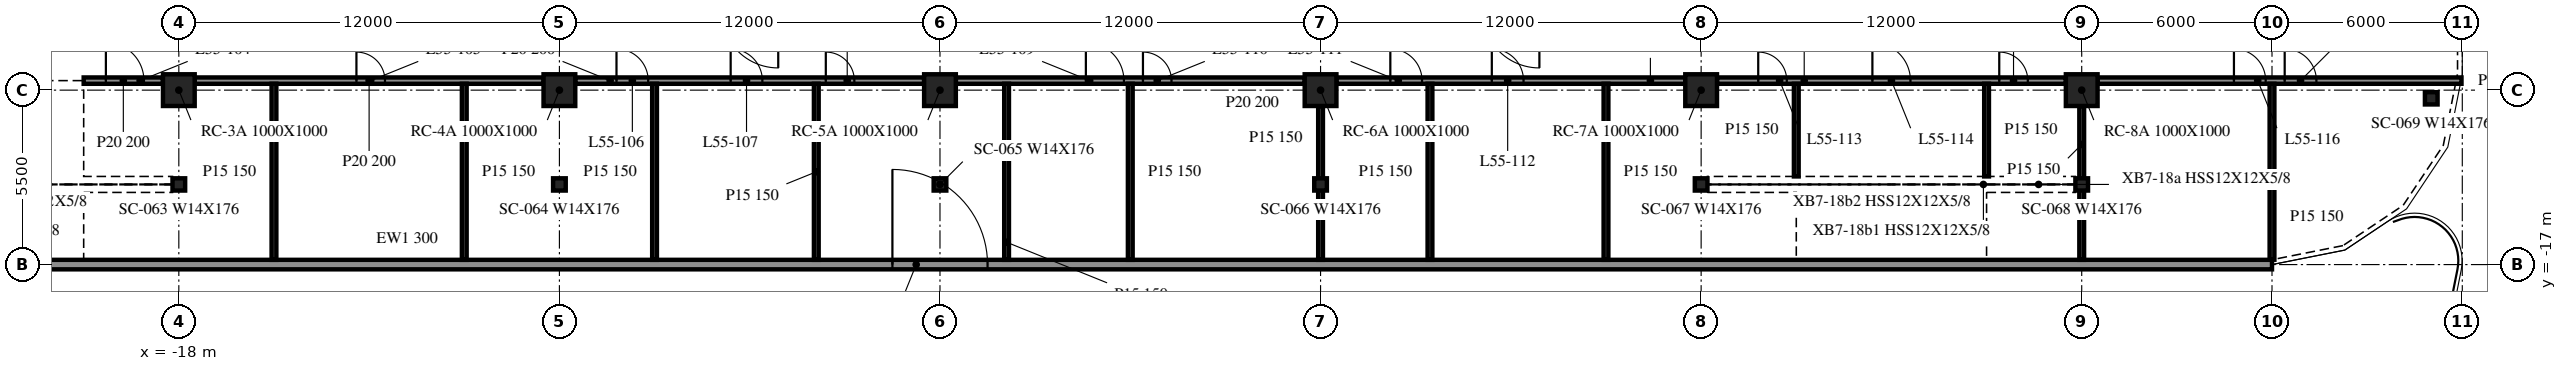
"""IFC4 building model, lengths in metres.
Left out: names, types, materials, properties, quantities, classifications, styles, units other than length and angle.
Written with IfcOpenShell. Run it as: python <this file> out.ifc"""

import sys

from ifc_helpers import new_model, si_unit, direction, frame, frame_2d, origin, origin_2d, place, context, subcontext, project, spatial, rectangle, i_section, extrude, element, fill, save


model = new_model("IFC4")
c1 = context("Model", 3, precision=1e-05, world=origin(), true_north=direction((0.0, 1.0)))
c2 = subcontext(c1, "Body", "Model", "MODEL_VIEW")
j1 = project(units=[si_unit("LENGTHUNIT", "METRE"), si_unit("PLANEANGLEUNIT", "RADIAN")], contexts=[c1])
p1 = place(None, origin())
s1 = spatial("IfcSite", under=j1, at=p1, CompositionType="ELEMENT")
p2 = place(p1, origin())
s2 = spatial("IfcBuilding", under=s1, at=p2, CompositionType="ELEMENT")
p3 = place(p2, frame((0.0, 0.0, 228.6)))
s3 = spatial("IfcBuildingStorey", under=s2, at=p3, CompositionType="ELEMENT", Elevation=228.6)
for number, where, z_axis, x_axis in (
    (1, (-18.0, -11.5, -0.34), (0.0, 0.0, 1.0), (1.0, 0.0, 0.0)),
    (2, (-6.0, -11.5, -0.34), (0.0, 0.0, 1.0), (1.0, 0.0, 0.0)),
    (3, (6.0, -11.5, -0.34), (0.0, 0.0, 1.0), (1.0, 0.0, 0.0)),
    (4, (18.0, -11.5, -0.34), (0.0, 0.0, 1.0), (1.0, 0.0, 0.0)),
    (5, (30.0, -11.5, -0.34), (0.0, 0.0, 1.0), (1.0, 0.0, 0.0)),
    (6, (42.0, -11.5, -0.34), (0.0, 0.0, 1.0), (1.0, 0.0, 0.0)),
):
    element("IfcColumn", number, at=place(p3, frame(where, z_axis=z_axis, x_axis=x_axis)), inside=s3, PredefinedType="COLUMN", context=c2, shape_type="SweptSolid", body=[
        extrude(rectangle(XDim=1.0, YDim=1.0, at=origin_2d()), origin(), (0.0, 0.0, 1.0), 3.8),
    ])
for number, where, z_axis, x_axis in (
    (7, (-18.0, -14.473, -0.34), (0.0, 0.0, 1.0), (1.0, 0.0, 0.0)),
    (8, (-6.0, -14.473, -0.34), (0.0, 0.0, 1.0), (1.0, 0.0, 0.0)),
    (9, (6.0, -14.473, -0.34), (0.0, 0.0, 1.0), (1.0, 0.0, 0.0)),
    (10, (18.0, -14.473, -0.34), (0.0, 0.0, 1.0), (1.0, 0.0, 0.0)),
    (11, (30.0, -14.473, -0.34), (0.0, 0.0, 1.0), (1.0, 0.0, 0.0)),
    (12, (42.0, -14.473, -0.34), (0.0, 0.0, 1.0), (1.0, 0.0, 0.0)),
    (13, (53.021, -11.758, -0.34), (0.0, 0.0, 1.0), (1.0, 0.0, 0.0)),
):
    element("IfcColumn", number, at=place(p3, frame(where, z_axis=z_axis, x_axis=x_axis)), inside=s3, PredefinedType="COLUMN", context=c2, shape_type="SweptSolid", body=[
        extrude(i_section(OverallWidth=0.399, OverallDepth=0.386, WebThickness=0.021, FlangeThickness=0.033, at=origin_2d()), origin(), (0.0, 0.0, 1.0), 3.8),
    ])
p4 = place(p3, frame((-36.0, -17.0, 0.0), z_axis=(0.0, 0.0, 1.0), x_axis=(1.0, 0.0, 0.0)))
e14 = element("IfcWall", 14, at=p4, inside=s3, PredefinedType="NOTDEFINED", context=c2, shape_type="SweptSolid", body=[
    extrude(rectangle(XDim=84.0, YDim=0.3, at=frame_2d((42.0, 0.0))), origin(), (0.0, 0.0, 1.0), 2.853),
])
p5 = place(p4, frame((40.5, 0.0, 0.0)))
e15 = element("IfcOpeningElement", 15, at=p5, cuts=e14, PredefinedType="OPENING", context=c2, shape_type="SweptSolid", body=[
    extrude(rectangle(XDim=3.0, YDim=2.4, at=frame_2d((1.5, 1.2))), frame((0.0, 0.16, 0.0), z_axis=(0.0, -1.0, 0.0), x_axis=(1.0, 0.0, 0.0)), (0.0, 0.0, 1.0), 0.32),
])
p6 = place(p3, frame((-21.0, -11.2, 0.0), z_axis=(0.0, 0.0, 1.0), x_axis=(1.0, 0.0, 0.0)))
e16 = element("IfcWall", 16, at=p6, inside=s3, PredefinedType="PARTITIONING", context=c2, shape_type="SweptSolid", body=[
    extrude(rectangle(XDim=2.5, YDim=0.2, at=frame_2d((1.25, 0.0))), origin(), (0.0, 0.0, 1.0), 3.46),
])
p7 = place(p6, frame((0.7, 0.0, 0.0)))
e17 = element("IfcOpeningElement", 17, at=p7, cuts=e16, PredefinedType="OPENING", context=c2, shape_type="SweptSolid", body=[
    extrude(rectangle(XDim=1.2, YDim=2.1, at=frame_2d((0.6, 1.05))), frame((0.0, 0.11, 0.0), z_axis=(0.0, -1.0, 0.0), x_axis=(1.0, 0.0, 0.0)), (0.0, 0.0, 1.0), 0.22),
])
p8 = place(p3, frame((-17.5, -11.2, 0.0), z_axis=(0.0, 0.0, 1.0), x_axis=(1.0, 0.0, 0.0)))
e18 = element("IfcWall", 18, at=p8, inside=s3, PredefinedType="PARTITIONING", context=c2, shape_type="SweptSolid", body=[
    extrude(rectangle(XDim=11.0, YDim=0.2, at=frame_2d((5.5, 0.0))), origin(), (0.0, 0.0, 1.0), 3.46),
])
p9 = place(p8, frame((5.1, 0.0, 0.0)))
e19 = element("IfcOpeningElement", 19, at=p9, cuts=e18, PredefinedType="OPENING", context=c2, shape_type="SweptSolid", body=[
    extrude(rectangle(XDim=0.9, YDim=2.1, at=frame_2d((0.45, 1.05))), frame((0.0, 0.11, 0.0), z_axis=(0.0, -1.0, 0.0), x_axis=(1.0, 0.0, 0.0)), (0.0, 0.0, 1.0), 0.22),
])
p10 = place(p3, frame((-5.5, -11.2, 0.0), z_axis=(0.0, 0.0, 1.0), x_axis=(1.0, 0.0, 0.0)))
e20 = element("IfcWall", 20, at=p10, inside=s3, PredefinedType="PARTITIONING", context=c2, shape_type="SweptSolid", body=[
    extrude(rectangle(XDim=11.0, YDim=0.2, at=frame_2d((5.5, 0.0))), origin(), (0.0, 0.0, 1.0), 3.46),
])
p11 = place(p10, frame((1.3, 0.0, 0.0)))
e21 = element("IfcOpeningElement", 21, at=p11, cuts=e20, PredefinedType="OPENING", context=c2, shape_type="SweptSolid", body=[
    extrude(rectangle(XDim=1.0, YDim=2.1, at=frame_2d((0.5, 1.05))), frame((0.0, 0.11, 0.0), z_axis=(0.0, -1.0, 0.0), x_axis=(1.0, 0.0, 0.0)), (0.0, 0.0, 1.0), 0.22),
])
p12 = place(p10, frame((4.9, 0.0, 0.0)))
e22 = element("IfcOpeningElement", 22, at=p12, cuts=e20, PredefinedType="OPENING", context=c2, shape_type="SweptSolid", body=[
    extrude(rectangle(XDim=1.0, YDim=2.1, at=frame_2d((0.5, 1.05))), frame((0.0, 0.11, 0.0), z_axis=(0.0, -1.0, 0.0), x_axis=(1.0, 0.0, 0.0)), (0.0, 0.0, 1.0), 0.22),
])
p13 = place(p10, frame((7.9, 0.0, 0.0)))
e23 = element("IfcOpeningElement", 23, at=p13, cuts=e20, PredefinedType="OPENING", context=c2, shape_type="SweptSolid", body=[
    extrude(rectangle(XDim=0.9, YDim=2.1, at=frame_2d((0.45, 1.05))), frame((0.0, 0.11, 0.0), z_axis=(0.0, -1.0, 0.0), x_axis=(1.0, 0.0, 0.0)), (0.0, 0.0, 1.0), 0.22),
])
p14 = place(p3, frame((6.5, -11.2, 0.0), z_axis=(0.0, 0.0, 1.0), x_axis=(1.0, 0.0, 0.0)))
e24 = element("IfcWall", 24, at=p14, inside=s3, PredefinedType="PARTITIONING", context=c2, shape_type="SweptSolid", body=[
    extrude(rectangle(XDim=11.0, YDim=0.2, at=frame_2d((5.5, 0.0))), origin(), (0.0, 0.0, 1.0), 3.46),
])
p15 = place(p14, frame((4.1, 0.0, 0.0)))
e25 = element("IfcOpeningElement", 25, at=p15, cuts=e24, PredefinedType="OPENING", context=c2, shape_type="SweptSolid", body=[
    extrude(rectangle(XDim=1.2, YDim=2.1, at=frame_2d((0.6, 1.05))), frame((0.0, 0.11, 0.0), z_axis=(0.0, -1.0, 0.0), x_axis=(1.0, 0.0, 0.0)), (0.0, 0.0, 1.0), 0.22),
])
p16 = place(p14, frame((5.9, 0.0, 0.0)))
e26 = element("IfcOpeningElement", 26, at=p16, cuts=e24, PredefinedType="OPENING", context=c2, shape_type="SweptSolid", body=[
    extrude(rectangle(XDim=0.9, YDim=2.1, at=frame_2d((0.45, 1.05))), frame((0.0, 0.11, 0.0), z_axis=(0.0, -1.0, 0.0), x_axis=(1.0, 0.0, 0.0)), (0.0, 0.0, 1.0), 0.22),
])
p17 = place(p3, frame((18.5, -11.2, 0.0), z_axis=(0.0, 0.0, 1.0), x_axis=(1.0, 0.0, 0.0)))
e27 = element("IfcWall", 27, at=p17, inside=s3, PredefinedType="PARTITIONING", context=c2, shape_type="SweptSolid", body=[
    extrude(rectangle(XDim=11.0, YDim=0.2, at=frame_2d((5.5, 0.0))), origin(), (0.0, 0.0, 1.0), 3.46),
])
p18 = place(p17, frame((1.7, 0.0, 0.0)))
e28 = element("IfcOpeningElement", 28, at=p18, cuts=e27, PredefinedType="OPENING", context=c2, shape_type="SweptSolid", body=[
    extrude(rectangle(XDim=1.0, YDim=2.1, at=frame_2d((0.5, 1.05))), frame((0.0, 0.11, 0.0), z_axis=(0.0, -1.0, 0.0), x_axis=(1.0, 0.0, 0.0)), (0.0, 0.0, 1.0), 0.22),
])
p19 = place(p17, frame((4.9, 0.0, 0.0)))
e29 = element("IfcOpeningElement", 29, at=p19, cuts=e27, PredefinedType="OPENING", context=c2, shape_type="SweptSolid", body=[
    extrude(rectangle(XDim=1.0, YDim=2.1, at=frame_2d((0.5, 1.05))), frame((0.0, 0.11, 0.0), z_axis=(0.0, -1.0, 0.0), x_axis=(1.0, 0.0, 0.0)), (0.0, 0.0, 1.0), 0.22),
])
p20 = place(p3, frame((30.5, -11.2, 0.0), z_axis=(0.0, 0.0, 1.0), x_axis=(1.0, 0.0, 0.0)))
e30 = element("IfcWall", 30, at=p20, inside=s3, PredefinedType="PARTITIONING", context=c2, shape_type="SweptSolid", body=[
    extrude(rectangle(XDim=11.0, YDim=0.2, at=frame_2d((5.5, 0.0))), origin(), (0.0, 0.0, 1.0), 3.46),
])
p21 = place(p20, frame((1.3, 0.0, 0.0)))
e31 = element("IfcOpeningElement", 31, at=p21, cuts=e30, PredefinedType="OPENING", context=c2, shape_type="SweptSolid", body=[
    extrude(rectangle(XDim=0.9, YDim=2.1, at=frame_2d((0.45, 1.05))), frame((0.0, 0.11, 0.0), z_axis=(0.0, -1.0, 0.0), x_axis=(1.0, 0.0, 0.0)), (0.0, 0.0, 1.0), 0.22),
])
p22 = place(p20, frame((4.9, 0.0, 0.0)))
e32 = element("IfcOpeningElement", 32, at=p22, cuts=e30, PredefinedType="OPENING", context=c2, shape_type="SweptSolid", body=[
    extrude(rectangle(XDim=1.2, YDim=2.1, at=frame_2d((0.6, 1.05))), frame((0.0, 0.11, 0.0), z_axis=(0.0, -1.0, 0.0), x_axis=(1.0, 0.0, 0.0)), (0.0, 0.0, 1.0), 0.22),
])
p23 = place(p20, frame((8.9, 0.0, 0.0)))
e33 = element("IfcOpeningElement", 33, at=p23, cuts=e30, PredefinedType="OPENING", context=c2, shape_type="SweptSolid", body=[
    extrude(rectangle(XDim=0.9, YDim=2.1, at=frame_2d((0.45, 1.05))), frame((0.0, 0.11, 0.0), z_axis=(0.0, -1.0, 0.0), x_axis=(1.0, 0.0, 0.0)), (0.0, 0.0, 1.0), 0.22),
])
p24 = place(p3, frame((42.5, -11.2, 0.0), z_axis=(0.0, 0.0, 1.0), x_axis=(1.0, 0.0, 0.0)))
e34 = element("IfcWall", 34, at=p24, inside=s3, PredefinedType="PARTITIONING", context=c2, shape_type="SweptSolid", body=[
    extrude(rectangle(XDim=11.475, YDim=0.2, at=frame_2d((5.738, 0.0))), origin(), (0.0, 0.0, 1.0), 3.46),
])
p25 = place(p24, frame((4.3, 0.0, 0.0)))
e35 = element("IfcOpeningElement", 35, at=p25, cuts=e34, PredefinedType="OPENING", context=c2, shape_type="SweptSolid", body=[
    extrude(rectangle(XDim=1.0, YDim=2.1, at=frame_2d((0.5, 1.05))), frame((0.0, 0.11, 0.0), z_axis=(0.0, -1.0, 0.0), x_axis=(1.0, 0.0, 0.0)), (0.0, 0.0, 1.0), 0.22),
])
p26 = place(p24, frame((5.9, 0.0, 0.0)))
e36 = element("IfcOpeningElement", 36, at=p26, cuts=e34, PredefinedType="OPENING", context=c2, shape_type="SweptSolid", body=[
    extrude(rectangle(XDim=1.0, YDim=2.1, at=frame_2d((0.5, 1.05))), frame((0.0, 0.11, 0.0), z_axis=(0.0, -1.0, 0.0), x_axis=(1.0, 0.0, 0.0)), (0.0, 0.0, 1.0), 0.22),
])
for number, where, z_axis, x_axis in (
    (37, (-15.0, -16.85, 0.0), (0.0, 0.0, 1.0), (0.0, 1.0, 0.0)),
    (38, (-9.0, -16.85, 0.0), (0.0, 0.0, 1.0), (0.0, 1.0, 0.0)),
    (39, (-3.0, -16.85, 0.0), (0.0, 0.0, 1.0), (0.0, 1.0, 0.0)),
    (40, (2.1, -16.85, 0.0), (0.0, 0.0, 1.0), (0.0, 1.0, 0.0)),
    (41, (8.1, -16.85, 0.0), (0.0, 0.0, 1.0), (0.0, 1.0, 0.0)),
    (42, (12.0, -16.85, 0.0), (0.0, 0.0, 1.0), (0.0, 1.0, 0.0)),
):
    element("IfcWall", number, at=place(p3, frame(where, z_axis=z_axis, x_axis=x_axis)), inside=s3, PredefinedType="PARTITIONING", context=c2, shape_type="SweptSolid", body=[
        extrude(rectangle(XDim=5.55, YDim=0.15, at=frame_2d((2.775, 0.0))), origin(), (0.0, 0.0, 1.0), 3.46),
    ])
p27 = place(p3, frame((18.0, -16.85, 0.0), z_axis=(0.0, 0.0, 1.0), x_axis=(0.0, 1.0, 0.0)))
e43 = element("IfcWall", 43, at=p27, inside=s3, PredefinedType="PARTITIONING", context=c2, shape_type="SweptSolid", body=[
    extrude(rectangle(XDim=4.85, YDim=0.15, at=frame_2d((2.425, 0.0))), origin(), (0.0, 0.0, 1.0), 3.46),
])
for number, where, z_axis, x_axis in (
    (44, (21.45, -16.85, 0.0), (0.0, 0.0, 1.0), (0.0, 1.0, 0.0)),
    (45, (27.0, -16.85, 0.0), (0.0, 0.0, 1.0), (0.0, 1.0, 0.0)),
):
    element("IfcWall", number, at=place(p3, frame(where, z_axis=z_axis, x_axis=x_axis)), inside=s3, PredefinedType="PARTITIONING", context=c2, shape_type="SweptSolid", body=[
        extrude(rectangle(XDim=5.55, YDim=0.15, at=frame_2d((2.775, 0.0))), origin(), (0.0, 0.0, 1.0), 3.46),
    ])
for number, where, z_axis, x_axis in (
    (46, (33.0, -14.221, 0.0), (0.0, 0.0, 1.0), (0.0, 1.0, 0.0)),
    (47, (39.0, -14.221, 0.0), (0.0, 0.0, 1.0), (0.0, 1.0, 0.0)),
):
    element("IfcWall", number, at=place(p3, frame(where, z_axis=z_axis, x_axis=x_axis)), inside=s3, PredefinedType="PARTITIONING", context=c2, shape_type="SweptSolid", body=[
        extrude(rectangle(XDim=2.921, YDim=0.15, at=frame_2d((1.46, 0.0))), origin(), (0.0, 0.0, 1.0), 3.46),
    ])
p28 = place(p3, frame((42.0, -16.85, 0.0), z_axis=(0.0, 0.0, 1.0), x_axis=(0.0, 1.0, 0.0)))
e48 = element("IfcWall", 48, at=p28, inside=s3, PredefinedType="PARTITIONING", context=c2, shape_type="SweptSolid", body=[
    extrude(rectangle(XDim=4.85, YDim=0.15, at=frame_2d((2.425, 0.0))), origin(), (0.0, 0.0, 1.0), 3.46),
])
p29 = place(p3, frame((48.0, -16.847, 0.0), z_axis=(0.0, 0.0, 1.0), x_axis=(0.0, 1.0, 0.0)))
e49 = element("IfcWall", 49, at=p29, inside=s3, PredefinedType="PARTITIONING", context=c2, shape_type="SweptSolid", body=[
    extrude(rectangle(XDim=5.547, YDim=0.15, at=frame_2d((2.773, 0.0))), origin(), (0.0, 0.0, 1.0), 3.46),
])
p30 = place(p5, origin())
e50 = element("IfcDoor", 50, at=p30, inside=s3, OperationType="SINGLE_SWING_LEFT", PredefinedType="DOOR", context=c2, shape_type="SweptSolid", body=[
    extrude(rectangle(XDim=3.0, YDim=2.4, at=frame_2d((1.5, 1.2))), frame((0.0, 0.025, 0.0), z_axis=(0.0, -1.0, 0.0), x_axis=(1.0, 0.0, 0.0)), (0.0, 0.0, 1.0), 0.05),
])
fill(e15, e50)
p31 = place(p7, origin())
e51 = element("IfcDoor", 51, at=p31, inside=s3, OperationType="SINGLE_SWING_LEFT", PredefinedType="DOOR", context=c2, shape_type="SweptSolid", body=[
    extrude(rectangle(XDim=1.2, YDim=2.1, at=frame_2d((0.6, 1.05))), frame((0.0, 0.025, 0.0), z_axis=(0.0, -1.0, 0.0), x_axis=(1.0, 0.0, 0.0)), (0.0, 0.0, 1.0), 0.05),
])
fill(e17, e51)
p32 = place(p9, origin())
e52 = element("IfcDoor", 52, at=p32, inside=s3, OperationType="SINGLE_SWING_LEFT", PredefinedType="DOOR", context=c2, shape_type="SweptSolid", body=[
    extrude(rectangle(XDim=0.9, YDim=2.1, at=frame_2d((0.45, 1.05))), frame((0.0, 0.025, 0.0), z_axis=(0.0, -1.0, 0.0), x_axis=(1.0, 0.0, 0.0)), (0.0, 0.0, 1.0), 0.05),
])
fill(e19, e52)
p33 = place(p11, origin())
e53 = element("IfcDoor", 53, at=p33, inside=s3, OperationType="SINGLE_SWING_RIGHT", PredefinedType="DOOR", context=c2, shape_type="SweptSolid", body=[
    extrude(rectangle(XDim=1.0, YDim=2.1, at=frame_2d((0.5, 1.05))), frame((0.0, 0.025, 0.0), z_axis=(0.0, -1.0, 0.0), x_axis=(1.0, 0.0, 0.0)), (0.0, 0.0, 1.0), 0.05),
])
fill(e21, e53)
p34 = place(p12, origin())
e54 = element("IfcDoor", 54, at=p34, inside=s3, OperationType="SINGLE_SWING_RIGHT", PredefinedType="DOOR", context=c2, shape_type="SweptSolid", body=[
    extrude(rectangle(XDim=1.0, YDim=2.1, at=frame_2d((0.5, 1.05))), frame((0.0, 0.025, 0.0), z_axis=(0.0, -1.0, 0.0), x_axis=(1.0, 0.0, 0.0)), (0.0, 0.0, 1.0), 0.05),
])
fill(e22, e54)
p35 = place(p13, origin())
e55 = element("IfcDoor", 55, at=p35, inside=s3, OperationType="SINGLE_SWING_LEFT", PredefinedType="DOOR", context=c2, shape_type="SweptSolid", body=[
    extrude(rectangle(XDim=0.9, YDim=2.1, at=frame_2d((0.45, 1.05))), frame((0.0, 0.025, 0.0), z_axis=(0.0, -1.0, 0.0), x_axis=(1.0, 0.0, 0.0)), (0.0, 0.0, 1.0), 0.05),
])
fill(e23, e55)
p36 = place(p15, origin())
e56 = element("IfcDoor", 56, at=p36, inside=s3, OperationType="SINGLE_SWING_RIGHT", PredefinedType="DOOR", context=c2, shape_type="SweptSolid", body=[
    extrude(rectangle(XDim=1.2, YDim=2.1, at=frame_2d((0.6, 1.05))), frame((0.0, 0.025, 0.0), z_axis=(0.0, -1.0, 0.0), x_axis=(1.0, 0.0, 0.0)), (0.0, 0.0, 1.0), 0.05),
])
fill(e25, e56)
p37 = place(p16, origin())
e57 = element("IfcDoor", 57, at=p37, inside=s3, OperationType="SINGLE_SWING_LEFT", PredefinedType="DOOR", context=c2, shape_type="SweptSolid", body=[
    extrude(rectangle(XDim=0.9, YDim=2.1, at=frame_2d((0.45, 1.05))), frame((0.0, 0.025, 0.0), z_axis=(0.0, -1.0, 0.0), x_axis=(1.0, 0.0, 0.0)), (0.0, 0.0, 1.0), 0.05),
])
fill(e26, e57)
p38 = place(p18, origin())
e58 = element("IfcDoor", 58, at=p38, inside=s3, OperationType="SINGLE_SWING_RIGHT", PredefinedType="DOOR", context=c2, shape_type="SweptSolid", body=[
    extrude(rectangle(XDim=1.0, YDim=2.1, at=frame_2d((0.5, 1.05))), frame((0.0, 0.025, 0.0), z_axis=(0.0, -1.0, 0.0), x_axis=(1.0, 0.0, 0.0)), (0.0, 0.0, 1.0), 0.05),
])
fill(e28, e58)
p39 = place(p19, origin())
e59 = element("IfcDoor", 59, at=p39, inside=s3, OperationType="SINGLE_SWING_RIGHT", PredefinedType="DOOR", context=c2, shape_type="SweptSolid", body=[
    extrude(rectangle(XDim=1.0, YDim=2.1, at=frame_2d((0.5, 1.05))), frame((0.0, 0.025, 0.0), z_axis=(0.0, -1.0, 0.0), x_axis=(1.0, 0.0, 0.0)), (0.0, 0.0, 1.0), 0.05),
])
fill(e29, e59)
p40 = place(p21, origin())
e60 = element("IfcDoor", 60, at=p40, inside=s3, OperationType="SINGLE_SWING_RIGHT", PredefinedType="DOOR", context=c2, shape_type="SweptSolid", body=[
    extrude(rectangle(XDim=0.9, YDim=2.1, at=frame_2d((0.45, 1.05))), frame((0.0, 0.025, 0.0), z_axis=(0.0, -1.0, 0.0), x_axis=(1.0, 0.0, 0.0)), (0.0, 0.0, 1.0), 0.05),
])
fill(e31, e60)
p41 = place(p22, origin())
e61 = element("IfcDoor", 61, at=p41, inside=s3, OperationType="SINGLE_SWING_RIGHT", PredefinedType="DOOR", context=c2, shape_type="SweptSolid", body=[
    extrude(rectangle(XDim=1.2, YDim=2.1, at=frame_2d((0.6, 1.05))), frame((0.0, 0.025, 0.0), z_axis=(0.0, -1.0, 0.0), x_axis=(1.0, 0.0, 0.0)), (0.0, 0.0, 1.0), 0.05),
])
fill(e32, e61)
p42 = place(p23, origin())
e62 = element("IfcDoor", 62, at=p42, inside=s3, OperationType="SINGLE_SWING_LEFT", PredefinedType="DOOR", context=c2, shape_type="SweptSolid", body=[
    extrude(rectangle(XDim=0.9, YDim=2.1, at=frame_2d((0.45, 1.05))), frame((0.0, 0.025, 0.0), z_axis=(0.0, -1.0, 0.0), x_axis=(1.0, 0.0, 0.0)), (0.0, 0.0, 1.0), 0.05),
])
fill(e33, e62)
p43 = place(p25, origin())
e63 = element("IfcDoor", 63, at=p43, inside=s3, OperationType="SINGLE_SWING_RIGHT", PredefinedType="DOOR", context=c2, shape_type="SweptSolid", body=[
    extrude(rectangle(XDim=1.0, YDim=2.1, at=frame_2d((0.5, 1.05))), frame((0.0, 0.025, 0.0), z_axis=(0.0, -1.0, 0.0), x_axis=(1.0, 0.0, 0.0)), (0.0, 0.0, 1.0), 0.05),
])
fill(e35, e63)
p44 = place(p26, origin())
e64 = element("IfcDoor", 64, at=p44, inside=s3, OperationType="SINGLE_SWING_LEFT", PredefinedType="DOOR", context=c2, shape_type="SweptSolid", body=[
    extrude(rectangle(XDim=1.0, YDim=2.1, at=frame_2d((0.5, 1.05))), frame((0.0, 0.025, 0.0), z_axis=(0.0, -1.0, 0.0), x_axis=(1.0, 0.0, 0.0)), (0.0, 0.0, 1.0), 0.05),
])
fill(e36, e64)
save(model, sys.argv[1])
